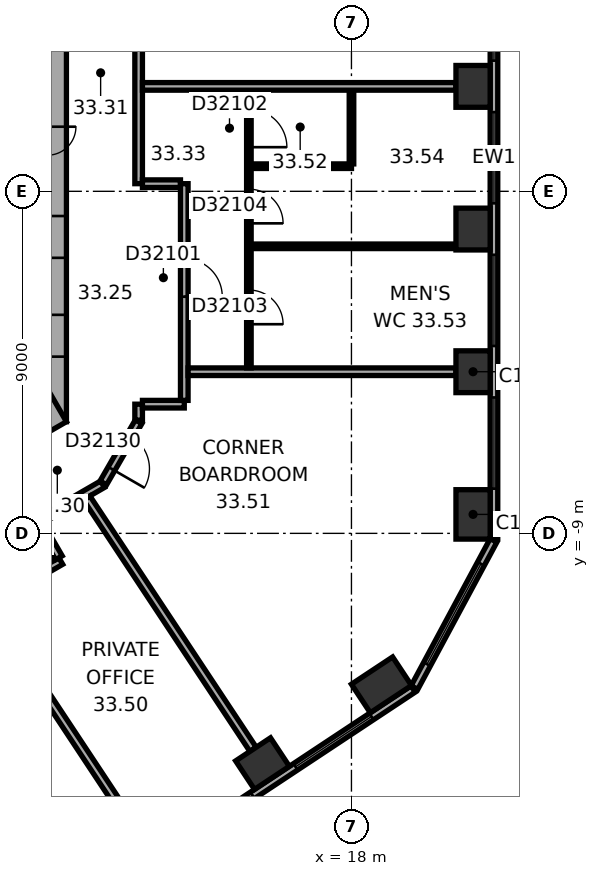
"""IFC4 building model, lengths in metres.
Left out: names, types, materials, properties, quantities, classifications, styles, units other than length and angle.
Written with IfcOpenShell. Run it as: python <this file> out.ifc"""

import sys

from ifc_helpers import new_model, si_unit, direction, frame, frame_2d, origin, origin_2d, place, context, subcontext, project, spatial, rectangle, extrude, element, fill, save


model = new_model("IFC4")
c1 = context("Model", 3, precision=1e-05, world=origin(), true_north=direction((0.0, 1.0)))
c2 = subcontext(c1, "Body", "Model", "MODEL_VIEW")
j1 = project(units=[si_unit("LENGTHUNIT", "METRE"), si_unit("PLANEANGLEUNIT", "RADIAN")], contexts=[c1])
p1 = place(None, origin())
s1 = spatial("IfcSite", under=j1, at=p1, CompositionType="ELEMENT")
p2 = place(p1, origin())
s2 = spatial("IfcBuilding", under=s1, at=p2, CompositionType="ELEMENT")
p3 = place(p2, frame((0.0, 0.0, 135.5)))
s3 = spatial("IfcBuildingStorey", under=s2, at=p3, CompositionType="ELEMENT", Elevation=135.5)
p4 = place(p3, frame((21.2, -8.501, 0.0), z_axis=(0.0, 0.0, 1.0), x_axis=(0.0, 1.0, 0.0)))
e1 = element("IfcColumn", 1, at=p4, inside=s3, PredefinedType="COLUMN", context=c2, shape_type="SweptSolid", body=[
    extrude(rectangle(XDim=1.3, YDim=0.9, at=origin_2d()), origin(), (0.0, 0.0, 1.0), 3.7),
])
for number, where, z_axis, x_axis in (
    (2, (21.2, -4.747, 0.0), (0.0, 0.0, 1.0), (0.0, 1.0, 0.0)),
    (3, (21.2, -0.993, 0.0), (0.0, 0.0, 1.0), (0.0, 1.0, 0.0)),
    (4, (21.2, 2.761, 0.0), (0.0, 0.0, 1.0), (0.0, 1.0, 0.0)),
    (5, (15.659, -15.058, 0.0), (0.0, 0.0, 1.0), (0.834, 0.552, 0.0)),
):
    element("IfcColumn", number, at=place(p3, frame(where, z_axis=z_axis, x_axis=x_axis)), inside=s3, PredefinedType="COLUMN", context=c2, shape_type="SweptSolid", body=[
        extrude(rectangle(XDim=1.1, YDim=0.9, at=origin_2d()), origin(), (0.0, 0.0, 1.0), 3.7),
    ])
p5 = place(p3, frame((18.79, -12.986, 0.0), z_axis=(0.0, 0.0, 1.0), x_axis=(0.833885822067, 0.551936985312, 0.0)))
e6 = element("IfcColumn", 6, at=p5, inside=s3, PredefinedType="COLUMN", context=c2, shape_type="SweptSolid", body=[
    extrude(rectangle(XDim=1.3, YDim=0.9, at=origin_2d()), origin(), (0.0, 0.0, 1.0), 3.7),
])
p6 = place(p3, frame((10.0, -6.062, 0.0), z_axis=(0.0, 0.0, 1.0), x_axis=(0.0, 1.0, 0.0)))
e7 = element("IfcWall", 7, at=p6, inside=s3, PredefinedType="SHEAR", context=c2, shape_type="SweptSolid", body=[
    extrude(rectangle(XDim=12.125, YDim=1.0, at=frame_2d((6.062, 0.0))), origin(), (0.0, 0.0, 1.0), 3.7),
])
p7 = place(p6, frame((6.262, 0.0, 0.0)))
e8 = element("IfcOpeningElement", 8, at=p7, cuts=e7, PredefinedType="OPENING", context=c2, shape_type="SweptSolid", body=[
    extrude(rectangle(XDim=1.5, YDim=2.1, at=frame_2d((0.75, 1.05))), frame((0.0, 0.51, 0.0), z_axis=(0.0, -1.0, 0.0), x_axis=(1.0, 0.0, 0.0)), (0.0, 0.0, 1.0), 1.02),
])
p8 = place(p6, frame((1.712, 0.0, 0.0)))
e9 = element("IfcOpeningElement", 9, at=p8, cuts=e7, PredefinedType="OPENING", context=c2, shape_type="SweptSolid", body=[
    extrude(rectangle(XDim=1.1, YDim=2.1, at=frame_2d((0.55, 1.05))), frame((0.0, 0.51, 0.0), z_axis=(0.0, -1.0, 0.0), x_axis=(1.0, 0.0, 0.0)), (0.0, 0.0, 1.0), 1.02),
])
p9 = place(p6, frame((4.312, 0.0, 0.0)))
e10 = element("IfcOpeningElement", 10, at=p9, cuts=e7, PredefinedType="OPENING", context=c2, shape_type="SweptSolid", body=[
    extrude(rectangle(XDim=1.1, YDim=2.1, at=frame_2d((0.55, 1.05))), frame((0.0, 0.51, 0.0), z_axis=(0.0, -1.0, 0.0), x_axis=(1.0, 0.0, 0.0)), (0.0, 0.0, 1.0), 1.02),
])
p10 = place(p3, frame((-0.25, -11.691, 0.0), z_axis=(0.0, 0.0, 1.0), x_axis=(0.866022616891, 0.50000482701, 0.0)))
e11 = element("IfcWall", 11, at=p10, inside=s3, PredefinedType="SHEAR", context=c2, shape_type="SweptSolid", body=[
    extrude(rectangle(XDim=12.125, YDim=1.0, at=frame_2d((6.062, 0.0))), origin(), (0.0, 0.0, 1.0), 3.7),
])
p11 = place(p10, frame((7.812, 0.0, 0.0)))
e12 = element("IfcOpeningElement", 12, at=p11, cuts=e11, PredefinedType="OPENING", context=c2, shape_type="SweptSolid", body=[
    extrude(rectangle(XDim=1.1, YDim=2.1, at=frame_2d((0.55, 1.05))), frame((0.0, 0.51, 0.0), z_axis=(0.0, -1.0, 0.0), x_axis=(1.0, 0.0, 0.0)), (0.0, 0.0, 1.0), 1.02),
])
p12 = place(p3, frame((21.75, -9.138, 0.0), z_axis=(0.0, 0.0, 1.0), x_axis=(0.0, 1.0, 0.0)))
e13 = element("IfcWall", 13, at=p12, inside=s3, PredefinedType="STANDARD", context=c2, shape_type="SweptSolid", body=[
    extrude(rectangle(XDim=20.044, YDim=0.2, at=frame_2d((10.022, 0.0))), origin(), (0.0, 0.0, 1.0), 3.7),
])
p13 = place(p12, frame((1.314, 0.0, 0.9)))
e14 = element("IfcOpeningElement", 14, at=p13, cuts=e13, PredefinedType="OPENING", context=c2, shape_type="SweptSolid", body=[
    extrude(rectangle(XDim=2.4, YDim=2.0, at=frame_2d((1.2, 1.0))), frame((0.0, 0.11, 0.0), z_axis=(0.0, -1.0, 0.0), x_axis=(1.0, 0.0, 0.0)), (0.0, 0.0, 1.0), 0.22),
])
p14 = place(p12, frame((5.069, 0.0, 0.9)))
e15 = element("IfcOpeningElement", 15, at=p14, cuts=e13, PredefinedType="OPENING", context=c2, shape_type="SweptSolid", body=[
    extrude(rectangle(XDim=2.4, YDim=2.0, at=frame_2d((1.2, 1.0))), frame((0.0, 0.11, 0.0), z_axis=(0.0, -1.0, 0.0), x_axis=(1.0, 0.0, 0.0)), (0.0, 0.0, 1.0), 0.22),
])
p15 = place(p12, frame((8.823, 0.0, 0.9)))
e16 = element("IfcOpeningElement", 16, at=p15, cuts=e13, PredefinedType="OPENING", context=c2, shape_type="SweptSolid", body=[
    extrude(rectangle(XDim=2.4, YDim=2.0, at=frame_2d((1.2, 1.0))), frame((0.0, 0.11, 0.0), z_axis=(0.0, -1.0, 0.0), x_axis=(1.0, 0.0, 0.0)), (0.0, 0.0, 1.0), 0.22),
])
p16 = place(p12, frame((12.577, 0.0, 0.9)))
e17 = element("IfcOpeningElement", 17, at=p16, cuts=e13, PredefinedType="OPENING", context=c2, shape_type="SweptSolid", body=[
    extrude(rectangle(XDim=2.4, YDim=2.0, at=frame_2d((1.2, 1.0))), frame((0.0, 0.11, 0.0), z_axis=(0.0, -1.0, 0.0), x_axis=(1.0, 0.0, 0.0)), (0.0, 0.0, 1.0), 0.22),
])
p17 = place(p12, frame((16.331, 0.0, 0.9)))
e18 = element("IfcOpeningElement", 18, at=p17, cuts=e13, PredefinedType="OPENING", context=c2, shape_type="SweptSolid", body=[
    extrude(rectangle(XDim=2.4, YDim=2.0, at=frame_2d((1.2, 1.0))), frame((0.0, 0.11, 0.0), z_axis=(0.0, -1.0, 0.0), x_axis=(1.0, 0.0, 0.0)), (0.0, 0.0, 1.0), 0.22),
])
p18 = place(p3, frame((2.911, -24.156, 0.0), z_axis=(0.0, 0.0, 1.0), x_axis=(0.833882163564, 0.551942512668, 0.0)))
e19 = element("IfcWall", 19, at=p18, inside=s3, PredefinedType="STANDARD", context=c2, shape_type="SweptSolid", body=[
    extrude(rectangle(XDim=20.044, YDim=0.2, at=frame_2d((10.022, 0.0))), origin(), (0.0, 0.0, 1.0), 3.7),
])
p19 = place(p18, frame((1.313, 0.0, 0.9)))
e20 = element("IfcOpeningElement", 20, at=p19, cuts=e19, PredefinedType="OPENING", context=c2, shape_type="SweptSolid", body=[
    extrude(rectangle(XDim=2.4, YDim=2.0, at=frame_2d((1.2, 1.0))), frame((0.0, 0.11, 0.0), z_axis=(0.0, -1.0, 0.0), x_axis=(1.0, 0.0, 0.0)), (0.0, 0.0, 1.0), 0.22),
])
p20 = place(p18, frame((5.067, 0.0, 0.9)))
e21 = element("IfcOpeningElement", 21, at=p20, cuts=e19, PredefinedType="OPENING", context=c2, shape_type="SweptSolid", body=[
    extrude(rectangle(XDim=2.4, YDim=2.0, at=frame_2d((1.2, 1.0))), frame((0.0, 0.11, 0.0), z_axis=(0.0, -1.0, 0.0), x_axis=(1.0, 0.0, 0.0)), (0.0, 0.0, 1.0), 0.22),
])
p21 = place(p18, frame((8.821, 0.0, 0.9)))
e22 = element("IfcOpeningElement", 22, at=p21, cuts=e19, PredefinedType="OPENING", context=c2, shape_type="SweptSolid", body=[
    extrude(rectangle(XDim=2.4, YDim=2.0, at=frame_2d((1.2, 1.0))), frame((0.0, 0.11, 0.0), z_axis=(0.0, -1.0, 0.0), x_axis=(1.0, 0.0, 0.0)), (0.0, 0.0, 1.0), 0.22),
])
p22 = place(p18, frame((12.575, 0.0, 0.9)))
e23 = element("IfcOpeningElement", 23, at=p22, cuts=e19, PredefinedType="OPENING", context=c2, shape_type="SweptSolid", body=[
    extrude(rectangle(XDim=2.4, YDim=2.0, at=frame_2d((1.2, 1.0))), frame((0.0, 0.11, 0.0), z_axis=(0.0, -1.0, 0.0), x_axis=(1.0, 0.0, 0.0)), (0.0, 0.0, 1.0), 0.22),
])
p23 = place(p18, frame((16.329, 0.0, 0.9)))
e24 = element("IfcOpeningElement", 24, at=p23, cuts=e19, PredefinedType="OPENING", context=c2, shape_type="SweptSolid", body=[
    extrude(rectangle(XDim=2.4, YDim=2.0, at=frame_2d((1.2, 1.0))), frame((0.0, 0.11, 0.0), z_axis=(0.0, -1.0, 0.0), x_axis=(1.0, 0.0, 0.0)), (0.0, 0.0, 1.0), 0.22),
])
p24 = place(p3, frame((19.658, -13.057, 0.0), z_axis=(0.0, 0.0, 1.0), x_axis=(0.473307879841, 0.880897071672, 0.0)))
e25 = element("IfcWall", 25, at=p24, inside=s3, PredefinedType="STANDARD", context=c2, shape_type="SweptSolid", body=[
    extrude(rectangle(XDim=4.395, YDim=0.2, at=frame_2d((2.197, 0.0))), origin(), (0.0, 0.0, 1.0), 3.7),
])
p25 = place(p24, frame((0.698, 0.0, 0.9)))
e26 = element("IfcOpeningElement", 26, at=p25, cuts=e25, PredefinedType="OPENING", context=c2, shape_type="SweptSolid", body=[
    extrude(rectangle(XDim=3.0, YDim=2.0, at=frame_2d((1.5, 1.0))), frame((0.0, 0.11, 0.0), z_axis=(0.0, -1.0, 0.0), x_axis=(1.0, 0.0, 0.0)), (0.0, 0.0, 1.0), 0.22),
])
p26 = place(p3, frame((7.319, -11.479, 0.0), z_axis=(0.0, 0.0, 1.0), x_axis=(0.866038154057, 0.49997791523, 0.0)))
e27 = element("IfcWall", 27, at=p26, inside=s3, PredefinedType="PARTITIONING", context=c2, shape_type="SweptSolid", body=[
    extrude(rectangle(XDim=3.502, YDim=0.2, at=frame_2d((1.751, 0.0))), origin(), (0.0, 0.0, 1.0), 3.35),
])
p27 = place(p26, frame((1.865, 0.0, 0.0)))
e28 = element("IfcOpeningElement", 28, at=p27, cuts=e27, PredefinedType="OPENING", context=c2, shape_type="SweptSolid", body=[
    extrude(rectangle(XDim=1.0, YDim=2.1, at=frame_2d((0.5, 1.05))), frame((0.0, 0.11, 0.0), z_axis=(0.0, -1.0, 0.0), x_axis=(1.0, 0.0, 0.0)), (0.0, 0.0, 1.0), 0.22),
])
p28 = place(p3, frame((9.752, -8.688, 0.0), z_axis=(0.0, 0.0, 1.0), x_axis=(0.865974105138, 0.500088841337, 0.0)))
e29 = element("IfcWall", 29, at=p28, inside=s3, PredefinedType="PARTITIONING", context=c2, shape_type="SweptSolid", body=[
    extrude(rectangle(XDim=1.961, YDim=0.2, at=frame_2d((0.98, 0.0))), origin(), (0.0, 0.0, 1.0), 3.35),
])
p29 = place(p3, frame((10.302, -9.642, 0.0), z_axis=(0.0, 0.0, 1.0), x_axis=(-0.500074377092, 0.865982457891, 0.0)))
e30 = element("IfcWall", 30, at=p29, inside=s3, PredefinedType="PARTITIONING", context=c2, shape_type="SweptSolid", body=[
    extrude(rectangle(XDim=1.001, YDim=0.2, at=frame_2d((0.5, 0.0))), origin(), (0.0, 0.0, 1.0), 3.35),
])
p30 = place(p3, frame((11.47, -7.673, 0.0), z_axis=(0.0, 0.0, 1.0), x_axis=(0.499964847546, 0.866045698112, 0.0)))
e31 = element("IfcWall", 31, at=p30, inside=s3, PredefinedType="PARTITIONING", context=c2, shape_type="SweptSolid", body=[
    extrude(rectangle(XDim=1.86, YDim=0.2, at=frame_2d((0.93, 0.0))), origin(), (0.0, 0.0, 1.0), 3.35),
])
p31 = place(p30, frame((0.43, 0.0, 0.0)))
e32 = element("IfcOpeningElement", 32, at=p31, cuts=e31, PredefinedType="OPENING", context=c2, shape_type="SweptSolid", body=[
    extrude(rectangle(XDim=1.0, YDim=2.1, at=frame_2d((0.5, 1.05))), frame((0.0, 0.11, 0.0), z_axis=(0.0, -1.0, 0.0), x_axis=(1.0, 0.0, 0.0)), (0.0, 0.0, 1.0), 0.22),
])
p32 = place(p3, frame((12.281, -16.755, 0.0), z_axis=(0.0, 0.0, 1.0), x_axis=(-0.551925794663, 0.833893228888, 0.0)))
e33 = element("IfcWall", 33, at=p32, inside=s3, PredefinedType="PARTITIONING", context=c2, shape_type="SweptSolid", body=[
    extrude(rectangle(XDim=6.953, YDim=0.2, at=frame_2d((3.476, 0.0))), origin(), (0.0, 0.0, 1.0), 3.35),
])
p33 = place(p3, frame((12.4, -6.022, 0.0), z_axis=(0.0, 0.0, 1.0), x_axis=(0.0, 1.0, 0.0)))
e34 = element("IfcWall", 34, at=p33, inside=s3, PredefinedType="PARTITIONING", context=c2, shape_type="SweptSolid", body=[
    extrude(rectangle(XDim=0.421, YDim=0.2, at=frame_2d((0.21, 0.0))), origin(), (0.0, 0.0, 1.0), 3.35),
])
p34 = place(p3, frame((12.4, 0.201, 0.0), z_axis=(0.0, 0.0, 1.0), x_axis=(0.0, 1.0, 0.0)))
e35 = element("IfcWall", 35, at=p34, inside=s3, PredefinedType="PARTITIONING", context=c2, shape_type="SweptSolid", body=[
    extrude(rectangle(XDim=5.861, YDim=0.2, at=frame_2d((2.931, 0.0))), origin(), (0.0, 0.0, 1.0), 3.35),
])
p35 = place(p34, frame((3.711, 0.0, 0.0)))
e36 = element("IfcOpeningElement", 36, at=p35, cuts=e35, PredefinedType="OPENING", context=c2, shape_type="SweptSolid", body=[
    extrude(rectangle(XDim=1.0, YDim=2.1, at=frame_2d((0.5, 1.05))), frame((0.0, 0.11, 0.0), z_axis=(0.0, -1.0, 0.0), x_axis=(1.0, 0.0, 0.0)), (0.0, 0.0, 1.0), 0.22),
])
p36 = place(p3, frame((12.5, -5.601, 0.0), z_axis=(0.0, 0.0, 1.0), x_axis=(1.0, 0.0, 0.0)))
e37 = element("IfcWall", 37, at=p36, inside=s3, PredefinedType="PARTITIONING", context=c2, shape_type="SweptSolid", body=[
    extrude(rectangle(XDim=1.101, YDim=0.2, at=frame_2d((0.551, 0.0))), origin(), (0.0, 0.0, 1.0), 3.35),
])
p37 = place(p3, frame((13.501, 0.201, 0.0), z_axis=(0.0, 0.0, 1.0), x_axis=(-1.0, 0.0, 0.0)))
e38 = element("IfcWall", 38, at=p37, inside=s3, PredefinedType="PARTITIONING", context=c2, shape_type="SweptSolid", body=[
    extrude(rectangle(XDim=1.001, YDim=0.2, at=frame_2d((0.5, 0.0))), origin(), (0.0, 0.0, 1.0), 3.35),
])
p38 = place(p3, frame((13.601, -5.501, 0.0), z_axis=(0.0, 0.0, 1.0), x_axis=(0.0, 1.0, 0.0)))
e39 = element("IfcWall", 39, at=p38, inside=s3, PredefinedType="PARTITIONING", context=c2, shape_type="SweptSolid", body=[
    extrude(rectangle(XDim=5.702, YDim=0.2, at=frame_2d((2.851, 0.0))), origin(), (0.0, 0.0, 1.0), 3.35),
])
p39 = place(p38, frame((2.728, 0.0, 0.0)))
e40 = element("IfcOpeningElement", 40, at=p39, cuts=e39, PredefinedType="OPENING", context=c2, shape_type="SweptSolid", body=[
    extrude(rectangle(XDim=1.0, YDim=2.1, at=frame_2d((0.5, 1.05))), frame((0.0, 0.11, 0.0), z_axis=(0.0, -1.0, 0.0), x_axis=(1.0, 0.0, 0.0)), (0.0, 0.0, 1.0), 0.22),
])
p40 = place(p3, frame((13.701, -4.747, 0.0), z_axis=(0.0, 0.0, 1.0), x_axis=(1.0, 0.0, 0.0)))
e41 = element("IfcWall", 41, at=p40, inside=s3, PredefinedType="PARTITIONING", context=c2, shape_type="SweptSolid", body=[
    extrude(rectangle(XDim=7.049, YDim=0.2, at=frame_2d((3.524, 0.0))), origin(), (0.0, 0.0, 1.0), 3.35),
])
p41 = place(p3, frame((15.301, -4.647, 0.0), z_axis=(0.0, 0.0, 1.0), x_axis=(0.0, 1.0, 0.0)))
e42 = element("IfcWall", 42, at=p41, inside=s3, PredefinedType="PARTITIONING", context=c2, shape_type="SweptSolid", body=[
    extrude(rectangle(XDim=7.308, YDim=0.12, at=frame_2d((3.654, 0.0))), origin(), (0.0, 0.0, 1.0), 3.35),
])
p42 = place(p41, frame((5.808, 0.0, 0.0)))
e43 = element("IfcOpeningElement", 43, at=p42, cuts=e42, PredefinedType="OPENING", context=c2, shape_type="SweptSolid", body=[
    extrude(rectangle(XDim=1.0, YDim=2.1, at=frame_2d((0.5, 1.05))), frame((0.0, 0.07, 0.0), z_axis=(0.0, -1.0, 0.0), x_axis=(1.0, 0.0, 0.0)), (0.0, 0.0, 1.0), 0.14),
])
p43 = place(p41, frame((1.15, 0.0, 0.0)))
e44 = element("IfcOpeningElement", 44, at=p43, cuts=e42, PredefinedType="OPENING", context=c2, shape_type="SweptSolid", body=[
    extrude(rectangle(XDim=0.9, YDim=2.1, at=frame_2d((0.45, 1.05))), frame((0.0, 0.07, 0.0), z_axis=(0.0, -1.0, 0.0), x_axis=(1.0, 0.0, 0.0)), (0.0, 0.0, 1.0), 0.14),
])
p44 = place(p41, frame((3.804, 0.0, 0.0)))
e45 = element("IfcOpeningElement", 45, at=p44, cuts=e42, PredefinedType="OPENING", context=c2, shape_type="SweptSolid", body=[
    extrude(rectangle(XDim=0.9, YDim=2.1, at=frame_2d((0.45, 1.05))), frame((0.0, 0.07, 0.0), z_axis=(0.0, -1.0, 0.0), x_axis=(1.0, 0.0, 0.0)), (0.0, 0.0, 1.0), 0.14),
])
p45 = place(p3, frame((15.361, 0.661, 0.0), z_axis=(0.0, 0.0, 1.0), x_axis=(1.0, 0.0, 0.0)))
e46 = element("IfcWall", 46, at=p45, inside=s3, PredefinedType="PARTITIONING", context=c2, shape_type="SweptSolid", body=[
    extrude(rectangle(XDim=2.64, YDim=0.12, at=frame_2d((1.32, 0.0))), origin(), (0.0, 0.0, 1.0), 3.35),
])
p46 = place(p3, frame((15.411, -14.683, 0.0), z_axis=(0.0, 0.0, 1.0), x_axis=(-0.551932106251, 0.833889051427, 0.0)))
e47 = element("IfcWall", 47, at=p46, inside=s3, PredefinedType="PARTITIONING", context=c2, shape_type="SweptSolid", body=[
    extrude(rectangle(XDim=7.926, YDim=0.2, at=frame_2d((3.963, 0.0))), origin(), (0.0, 0.0, 1.0), 2.55),
])
p47 = place(p3, frame((18.001, 0.721, 0.0), z_axis=(0.0, 0.0, 1.0), x_axis=(0.0, 1.0, 0.0)))
e48 = element("IfcWall", 48, at=p47, inside=s3, PredefinedType="PARTITIONING", context=c2, shape_type="SweptSolid", body=[
    extrude(rectangle(XDim=1.94, YDim=0.12, at=frame_2d((0.97, 0.0))), origin(), (0.0, 0.0, 1.0), 3.35),
])
p48 = place(p3, frame((20.75, -1.447, 0.0), z_axis=(0.0, 0.0, 1.0), x_axis=(-1.0, 0.0, 0.0)))
e49 = element("IfcWall", 49, at=p48, inside=s3, PredefinedType="PARTITIONING", context=c2, shape_type="SweptSolid", body=[
    extrude(rectangle(XDim=5.389, YDim=0.12, at=frame_2d((2.694, 0.0))), origin(), (0.0, 0.0, 1.0), 2.55),
])
p49 = place(p3, frame((20.75, 2.761, 0.0), z_axis=(0.0, 0.0, 1.0), x_axis=(-1.0, 0.0, 0.0)))
e50 = element("IfcWall", 50, at=p49, inside=s3, PredefinedType="PARTITIONING", context=c2, shape_type="SweptSolid", body=[
    extrude(rectangle(XDim=8.25, YDim=0.2, at=frame_2d((4.125, 0.0))), origin(), (0.0, 0.0, 1.0), 3.35),
])
p50 = place(p13, origin())
e51 = element("IfcWindow", 51, at=p50, inside=s3, PartitioningType="SINGLE_PANEL", PredefinedType="WINDOW", context=c2, shape_type="SweptSolid", body=[
    extrude(rectangle(XDim=2.4, YDim=2.0, at=frame_2d((1.2, 1.0))), frame((0.0, 0.03, 0.0), z_axis=(0.0, -1.0, 0.0), x_axis=(1.0, 0.0, 0.0)), (0.0, 0.0, 1.0), 0.06),
])
fill(e14, e51)
p51 = place(p14, origin())
e52 = element("IfcWindow", 52, at=p51, inside=s3, PartitioningType="SINGLE_PANEL", PredefinedType="WINDOW", context=c2, shape_type="SweptSolid", body=[
    extrude(rectangle(XDim=2.4, YDim=2.0, at=frame_2d((1.2, 1.0))), frame((0.0, 0.03, 0.0), z_axis=(0.0, -1.0, 0.0), x_axis=(1.0, 0.0, 0.0)), (0.0, 0.0, 1.0), 0.06),
])
fill(e15, e52)
p52 = place(p15, origin())
e53 = element("IfcWindow", 53, at=p52, inside=s3, PartitioningType="SINGLE_PANEL", PredefinedType="WINDOW", context=c2, shape_type="SweptSolid", body=[
    extrude(rectangle(XDim=2.4, YDim=2.0, at=frame_2d((1.2, 1.0))), frame((0.0, 0.03, 0.0), z_axis=(0.0, -1.0, 0.0), x_axis=(1.0, 0.0, 0.0)), (0.0, 0.0, 1.0), 0.06),
])
fill(e16, e53)
p53 = place(p16, origin())
e54 = element("IfcWindow", 54, at=p53, inside=s3, PartitioningType="SINGLE_PANEL", PredefinedType="WINDOW", context=c2, shape_type="SweptSolid", body=[
    extrude(rectangle(XDim=2.4, YDim=2.0, at=frame_2d((1.2, 1.0))), frame((0.0, 0.03, 0.0), z_axis=(0.0, -1.0, 0.0), x_axis=(1.0, 0.0, 0.0)), (0.0, 0.0, 1.0), 0.06),
])
fill(e17, e54)
p54 = place(p22, origin())
e55 = element("IfcWindow", 55, at=p54, inside=s3, PartitioningType="SINGLE_PANEL", PredefinedType="WINDOW", context=c2, shape_type="SweptSolid", body=[
    extrude(rectangle(XDim=2.4, YDim=2.0, at=frame_2d((1.2, 1.0))), frame((0.0, 0.03, 0.0), z_axis=(0.0, -1.0, 0.0), x_axis=(1.0, 0.0, 0.0)), (0.0, 0.0, 1.0), 0.06),
])
fill(e23, e55)
p55 = place(p23, origin())
e56 = element("IfcWindow", 56, at=p55, inside=s3, PartitioningType="SINGLE_PANEL", PredefinedType="WINDOW", context=c2, shape_type="SweptSolid", body=[
    extrude(rectangle(XDim=2.4, YDim=2.0, at=frame_2d((1.2, 1.0))), frame((0.0, 0.03, 0.0), z_axis=(0.0, -1.0, 0.0), x_axis=(1.0, 0.0, 0.0)), (0.0, 0.0, 1.0), 0.06),
])
fill(e24, e56)
p56 = place(p25, origin())
e57 = element("IfcWindow", 57, at=p56, inside=s3, PartitioningType="SINGLE_PANEL", PredefinedType="WINDOW", context=c2, shape_type="SweptSolid", body=[
    extrude(rectangle(XDim=3.0, YDim=2.0, at=frame_2d((1.5, 1.0))), frame((0.0, 0.03, 0.0), z_axis=(0.0, -1.0, 0.0), x_axis=(1.0, 0.0, 0.0)), (0.0, 0.0, 1.0), 0.06),
])
fill(e26, e57)
p57 = place(p39, origin())
e58 = element("IfcDoor", 58, at=p57, inside=s3, OperationType="SINGLE_SWING_LEFT", PredefinedType="DOOR", context=c2, shape_type="SweptSolid", body=[
    extrude(rectangle(XDim=1.0, YDim=2.1, at=frame_2d((0.5, 1.05))), frame((0.0, 0.025, 0.0), z_axis=(0.0, -1.0, 0.0), x_axis=(1.0, 0.0, 0.0)), (0.0, 0.0, 1.0), 0.05),
])
fill(e40, e58)
p58 = place(p42, origin())
e59 = element("IfcDoor", 59, at=p58, inside=s3, OperationType="SINGLE_SWING_LEFT", PredefinedType="DOOR", context=c2, shape_type="SweptSolid", body=[
    extrude(rectangle(XDim=1.0, YDim=2.1, at=frame_2d((0.5, 1.05))), frame((0.0, 0.025, 0.0), z_axis=(0.0, -1.0, 0.0), x_axis=(1.0, 0.0, 0.0)), (0.0, 0.0, 1.0), 0.05),
])
fill(e43, e59)
p59 = place(p43, origin())
e60 = element("IfcDoor", 60, at=p59, inside=s3, OperationType="SINGLE_SWING_LEFT", PredefinedType="DOOR", context=c2, shape_type="SweptSolid", body=[
    extrude(rectangle(XDim=0.9, YDim=2.1, at=frame_2d((0.45, 1.05))), frame((0.0, 0.025, 0.0), z_axis=(0.0, -1.0, 0.0), x_axis=(1.0, 0.0, 0.0)), (0.0, 0.0, 1.0), 0.05),
])
fill(e44, e60)
p60 = place(p44, origin())
e61 = element("IfcDoor", 61, at=p60, inside=s3, OperationType="SINGLE_SWING_LEFT", PredefinedType="DOOR", context=c2, shape_type="SweptSolid", body=[
    extrude(rectangle(XDim=0.9, YDim=2.1, at=frame_2d((0.45, 1.05))), frame((0.0, 0.025, 0.0), z_axis=(0.0, -1.0, 0.0), x_axis=(1.0, 0.0, 0.0)), (0.0, 0.0, 1.0), 0.05),
])
fill(e45, e61)
p61 = place(p31, origin())
e62 = element("IfcDoor", 62, at=p61, inside=s3, OperationType="SINGLE_SWING_LEFT", PredefinedType="DOOR", context=c2, shape_type="SweptSolid", body=[
    extrude(rectangle(XDim=1.0, YDim=2.1, at=frame_2d((0.5, 1.05))), frame((0.0, 0.025, 0.0), z_axis=(0.0, -1.0, 0.0), x_axis=(1.0, 0.0, 0.0)), (0.0, 0.0, 1.0), 0.05),
])
fill(e32, e62)
save(model, sys.argv[1])
